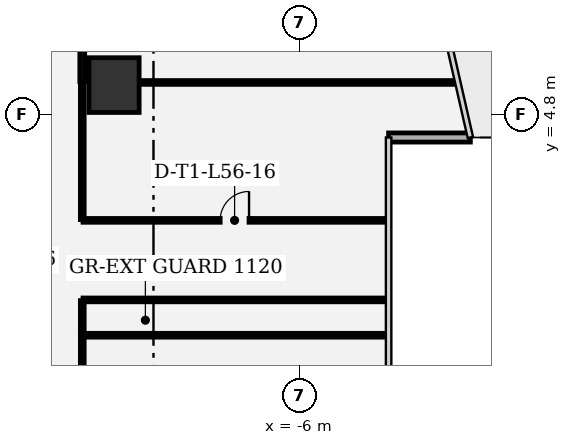
"""IFC4 building model, lengths in metres.
Left out: names, types, materials, properties, quantities, classifications, styles, units other than length and angle.
Written with IfcOpenShell. Run it as: python <this file> out.ifc"""

import sys

from ifc_helpers import new_model, si_unit, direction, frame, frame_2d, origin, origin_2d, place, context, subcontext, project, spatial, rectangle, extrude, element, fill, save


model = new_model("IFC4")
c1 = context("Model", 3, precision=1e-05, world=origin(), true_north=direction((0.0, 1.0)))
c2 = subcontext(c1, "Body", "Model", "MODEL_VIEW")
j1 = project(units=[si_unit("LENGTHUNIT", "METRE"), si_unit("PLANEANGLEUNIT", "RADIAN")], contexts=[c1])
p1 = place(None, origin())
s1 = spatial("IfcSite", under=j1, at=p1, CompositionType="ELEMENT")
p2 = place(p1, origin())
s2 = spatial("IfcBuilding", under=s1, at=p2, CompositionType="ELEMENT")
p3 = place(p2, frame((0.0, 0.0, 241.5)))
s3 = spatial("IfcBuildingStorey", under=s2, at=p3, CompositionType="ELEMENT", Elevation=241.5)
p4 = place(p3, frame((-12.097, 5.758, 0.0), z_axis=(0.0, 0.0, 1.0), x_axis=(1.0, 0.0, 0.0)))
e1 = element("IfcColumn", 1, at=p4, inside=s3, PredefinedType="COLUMN", context=c2, shape_type="SweptSolid", body=[
    extrude(rectangle(XDim=1.65, YDim=1.8, at=origin_2d()), origin(), (0.0, 0.0, 1.0), 4.05),
])
p5 = place(p3, frame((-3.066, 4.034, 0.0), z_axis=(0.0, 0.0, 1.0), x_axis=(1.0, 0.0, 0.0)))
e2 = element("IfcWall", 2, at=p5, inside=s3, PredefinedType="SOLIDWALL", context=c2, shape_type="SweptSolid", body=[
    extrude(rectangle(XDim=2.689, YDim=0.3, at=frame_2d((1.345, 0.0))), origin(), (0.0, 0.0, 1.0), 3.78),
])
p6 = place(p3, frame((-3.146, -2.47, 0.0), z_axis=(0.0, 0.0, 1.0), x_axis=(-1.0, 0.0, 0.0)))
e3 = element("IfcWall", 3, at=p6, inside=s3, PredefinedType="PARTITIONING", context=c2, shape_type="SweptSolid", body=[
    extrude(rectangle(XDim=9.971, YDim=0.125, at=frame_2d((4.985, 0.0))), origin(), (0.0, 0.0, 1.0), 3.78),
])
p7 = place(p3, frame((-13.142, -2.496, 0.0), z_axis=(0.0, 0.0, 1.0), x_axis=(0.0, -1.0, 0.0)))
e4 = element("IfcWall", 4, at=p7, inside=s3, PredefinedType="PARTITIONING", context=c2, shape_type="SweptSolid", body=[
    extrude(rectangle(XDim=7.001, YDim=0.125, at=frame_2d((3.501, 0.0))), origin(), (0.0, 0.0, 1.0), 3.0),
])
p8 = place(p7, frame((4.323, 0.0, 0.0)))
e5 = element("IfcOpeningElement", 5, at=p8, cuts=e4, PredefinedType="OPENING", context=c2, shape_type="SweptSolid", body=[
    extrude(rectangle(XDim=0.95, YDim=2.15, at=frame_2d((0.475, 1.075))), frame((0.0, 0.073, 0.0), z_axis=(0.0, -1.0, 0.0), x_axis=(1.0, 0.0, 0.0)), (0.0, 0.0, 1.0), 0.145),
])
p9 = place(p3, frame((-0.87, 5.844, 0.0), z_axis=(0.0, 0.0, 1.0), x_axis=(-1.0, 0.0, 0.0)))
e6 = element("IfcWall", 6, at=p9, inside=s3, PredefinedType="PARTITIONING", context=c2, shape_type="SweptSolid", body=[
    extrude(rectangle(XDim=10.337, YDim=0.125, at=frame_2d((5.168, 0.0))), origin(), (0.0, 0.0, 1.0), 3.78),
])
p10 = place(p3, frame((-13.142, 5.819, 0.0), z_axis=(0.0, 0.0, 1.0), x_axis=(0.0, -1.0, 0.0)))
e7 = element("IfcWall", 7, at=p10, inside=s3, PredefinedType="PARTITIONING", context=c2, shape_type="SweptSolid", body=[
    extrude(rectangle(XDim=4.486, YDim=0.125, at=frame_2d((2.243, 0.0))), origin(), (0.0, 0.0, 1.0), 3.78),
])
p11 = place(p3, frame((-13.117, 1.308, 0.0), z_axis=(0.0, 0.0, 1.0), x_axis=(1.0, 0.0, 0.0)))
e8 = element("IfcWall", 8, at=p11, inside=s3, PredefinedType="PARTITIONING", context=c2, shape_type="SweptSolid", body=[
    extrude(rectangle(XDim=9.971, YDim=0.125, at=frame_2d((4.985, 0.0))), origin(), (0.0, 0.0, 1.0), 3.78),
])
p12 = place(p11, frame((4.51, 0.0, 0.0)))
e9 = element("IfcOpeningElement", 9, at=p12, cuts=e8, PredefinedType="OPENING", context=c2, shape_type="SweptSolid", body=[
    extrude(rectangle(XDim=0.95, YDim=2.15, at=frame_2d((0.475, 1.075))), frame((0.0, 0.073, 0.0), z_axis=(0.0, -1.0, 0.0), x_axis=(1.0, 0.0, 0.0)), (0.0, 0.0, 1.0), 0.145),
])
p13 = place(p3, frame((-13.117, -1.308, 0.0), z_axis=(0.0, 0.0, 1.0), x_axis=(1.0, 0.0, 0.0)))
e10 = element("IfcWall", 10, at=p13, inside=s3, PredefinedType="PARTITIONING", context=c2, shape_type="SweptSolid", body=[
    extrude(rectangle(XDim=9.971, YDim=0.125, at=frame_2d((4.985, 0.0))), origin(), (0.0, 0.0, 1.0), 3.78),
])
p14 = place(p3, frame((-13.142, -1.333, 0.0), z_axis=(0.0, 0.0, 1.0), x_axis=(0.0, -1.0, 0.0)))
e11 = element("IfcWall", 11, at=p14, inside=s3, PredefinedType="PARTITIONING", context=c2, shape_type="SweptSolid", body=[
    extrude(rectangle(XDim=1.104, YDim=0.125, at=frame_2d((0.552, 0.0))), origin(), (0.0, 0.0, 1.0), 3.78),
])
p15 = place(p3, frame((-13.142, 10.758, 0.0), z_axis=(0.0, 0.0, 1.0), x_axis=(0.0, -1.0, 0.0)))
e12 = element("IfcWall", 12, at=p15, inside=s3, PredefinedType="PARTITIONING", context=c2, shape_type="SweptSolid", body=[
    extrude(rectangle(XDim=4.881, YDim=0.16, at=frame_2d((2.44, 0.0))), origin(), (0.0, 0.0, 1.0), 3.0),
])
p16 = place(p15, frame((1.891, 0.0, 0.0)))
e13 = element("IfcOpeningElement", 13, at=p16, cuts=e12, PredefinedType="OPENING", context=c2, shape_type="SweptSolid", body=[
    extrude(rectangle(XDim=1.1, YDim=2.15, at=frame_2d((0.55, 1.075))), frame((0.0, 0.09, 0.0), z_axis=(0.0, -1.0, 0.0), x_axis=(1.0, 0.0, 0.0)), (0.0, 0.0, 1.0), 0.18),
])
p17 = place(p12, origin())
e14 = element("IfcDoor", 14, at=p17, inside=s3, OperationType="SINGLE_SWING_RIGHT", PredefinedType="DOOR", context=c2, shape_type="SweptSolid", body=[
    extrude(rectangle(XDim=0.95, YDim=2.15, at=frame_2d((0.475, 1.075))), frame((0.0, 0.025, 0.0), z_axis=(0.0, -1.0, 0.0), x_axis=(1.0, 0.0, 0.0)), (0.0, 0.0, 1.0), 0.05),
])
fill(e9, e14)
save(model, sys.argv[1])
